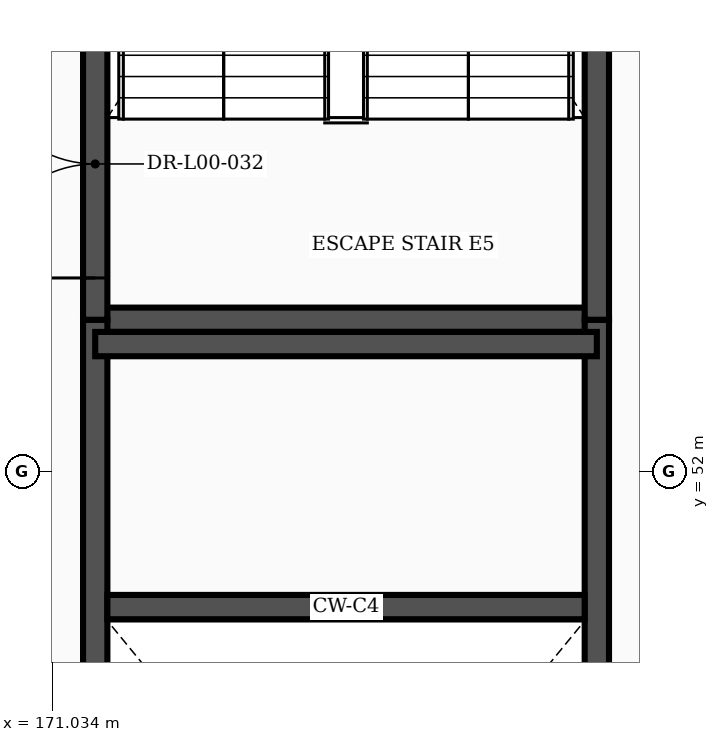
"""IFC4 building model, lengths in metres.
Left out: names, types, materials, properties, quantities, classifications, styles, units other than length and angle.
Written with IfcOpenShell. Run it as: python <this file> out.ifc"""

import sys

from ifc_helpers import new_model, si_unit, direction, frame, frame_2d, origin, place, context, subcontext, project, spatial, rectangle, extrude, element, fill, save


model = new_model("IFC4")
c1 = context("Model", 3, precision=1e-05, world=origin(), true_north=direction((0.0, 1.0)))
c2 = subcontext(c1, "Body", "Model", "MODEL_VIEW")
j1 = project(units=[si_unit("LENGTHUNIT", "METRE"), si_unit("PLANEANGLEUNIT", "RADIAN")], contexts=[c1])
p1 = place(None, origin())
s1 = spatial("IfcSite", under=j1, at=p1, CompositionType="ELEMENT")
p2 = place(p1, origin())
s2 = spatial("IfcBuilding", under=s1, at=p2, CompositionType="ELEMENT")
p3 = place(p2, origin())
s3 = spatial("IfcBuildingStorey", under=s2, at=p3, CompositionType="ELEMENT", Elevation=0.0)
p4 = place(p3, frame((171.6, 54.0, 0.0), z_axis=(0.0, 0.0, 1.0), x_axis=(1.0, 0.0, 0.0)))
e1 = element("IfcWall", 1, at=p4, inside=s3, PredefinedType="SHEAR", context=c2, shape_type="SweptSolid", body=[
    extrude(rectangle(XDim=6.6, YDim=0.32, at=frame_2d((3.3, 0.0))), origin(), (0.0, 0.0, 1.0), 5.75),
])
p5 = place(p3, frame((171.6, 39.4, 0.0), z_axis=(0.0, 0.0, 1.0), x_axis=(0.0, 1.0, 0.0)))
e2 = element("IfcWall", 2, at=p5, inside=s3, PredefinedType="SHEAR", context=c2, shape_type="SweptSolid", body=[
    extrude(rectangle(XDim=14.6, YDim=0.32, at=frame_2d((7.3, 0.0))), origin(), (0.0, 0.0, 1.0), 5.75),
])
p6 = place(p5, frame((0.55, 0.0, 0.0)))
e3 = element("IfcOpeningElement", 3, at=p6, cuts=e2, PredefinedType="OPENING", context=c2, shape_type="SweptSolid", body=[
    extrude(rectangle(XDim=3.0, YDim=2.25, at=frame_2d((1.5, 1.125))), frame((0.0, 0.172, 0.0), z_axis=(0.0, -1.0, 0.0), x_axis=(1.0, 0.0, 0.0)), (0.0, 0.0, 1.0), 0.344),
])
p7 = place(p3, frame((178.2, 39.4, 0.0), z_axis=(0.0, 0.0, 1.0), x_axis=(0.0, 1.0, 0.0)))
e4 = element("IfcWall", 4, at=p7, inside=s3, PredefinedType="SHEAR", context=c2, shape_type="SweptSolid", body=[
    extrude(rectangle(XDim=14.6, YDim=0.32, at=frame_2d((7.3, 0.0))), origin(), (0.0, 0.0, 1.0), 5.75),
])
p8 = place(p3, frame((171.76, 50.22, 0.0), z_axis=(0.0, 0.0, 1.0), x_axis=(1.0, 0.0, 0.0)))
e5 = element("IfcWall", 5, at=p8, inside=s3, PredefinedType="SHEAR", context=c2, shape_type="SweptSolid", body=[
    extrude(rectangle(XDim=6.28, YDim=0.32, at=frame_2d((3.14, 0.0))), origin(), (0.0, 0.0, 1.0), 5.75),
])
p9 = place(p3, frame((171.6, 53.68, 0.0), z_axis=(0.0, 0.0, 1.0), x_axis=(1.0, 0.0, 0.0)))
e6 = element("IfcWall", 6, at=p9, inside=s3, PredefinedType="SHEAR", context=c2, shape_type="SweptSolid", body=[
    extrude(rectangle(XDim=6.6, YDim=0.32, at=frame_2d((3.3, 0.0))), origin(), (0.0, 0.0, 1.0), 5.75),
])
p10 = place(p3, frame((171.6, 54.0, 0.0), z_axis=(0.0, 0.0, 1.0), x_axis=(0.0, 1.0, 0.0)))
e7 = element("IfcWall", 7, at=p10, inside=s3, PredefinedType="SHEAR", context=c2, shape_type="SweptSolid", body=[
    extrude(rectangle(XDim=12.0, YDim=0.32, at=frame_2d((6.0, 0.0))), origin(), (0.0, 0.0, 1.0), 5.75),
])
p11 = place(p10, frame((0.55, 0.0, 0.0)))
e8 = element("IfcOpeningElement", 8, at=p11, cuts=e7, PredefinedType="OPENING", context=c2, shape_type="SweptSolid", body=[
    extrude(rectangle(XDim=3.0, YDim=2.25, at=frame_2d((1.5, 1.125))), frame((0.0, 0.172, 0.0), z_axis=(0.0, -1.0, 0.0), x_axis=(1.0, 0.0, 0.0)), (0.0, 0.0, 1.0), 0.344),
])
p12 = place(p3, frame((178.2, 54.0, 0.0), z_axis=(0.0, 0.0, 1.0), x_axis=(0.0, 1.0, 0.0)))
e9 = element("IfcWall", 9, at=p12, inside=s3, PredefinedType="SHEAR", context=c2, shape_type="SweptSolid", body=[
    extrude(rectangle(XDim=12.0, YDim=0.32, at=frame_2d((6.0, 0.0))), origin(), (0.0, 0.0, 1.0), 5.75),
])
p13 = place(p11, origin())
e10 = element("IfcDoor", 10, at=p13, inside=s3, OperationType="DOUBLE_DOOR_SINGLE_SWING", PredefinedType="DOOR", context=c2, shape_type="SweptSolid", body=[
    extrude(rectangle(XDim=3.0, YDim=2.25, at=frame_2d((1.5, 1.125))), frame((0.0, 0.025, 0.0), z_axis=(0.0, -1.0, 0.0), x_axis=(1.0, 0.0, 0.0)), (0.0, 0.0, 1.0), 0.05),
])
fill(e8, e10)
save(model, sys.argv[1])
